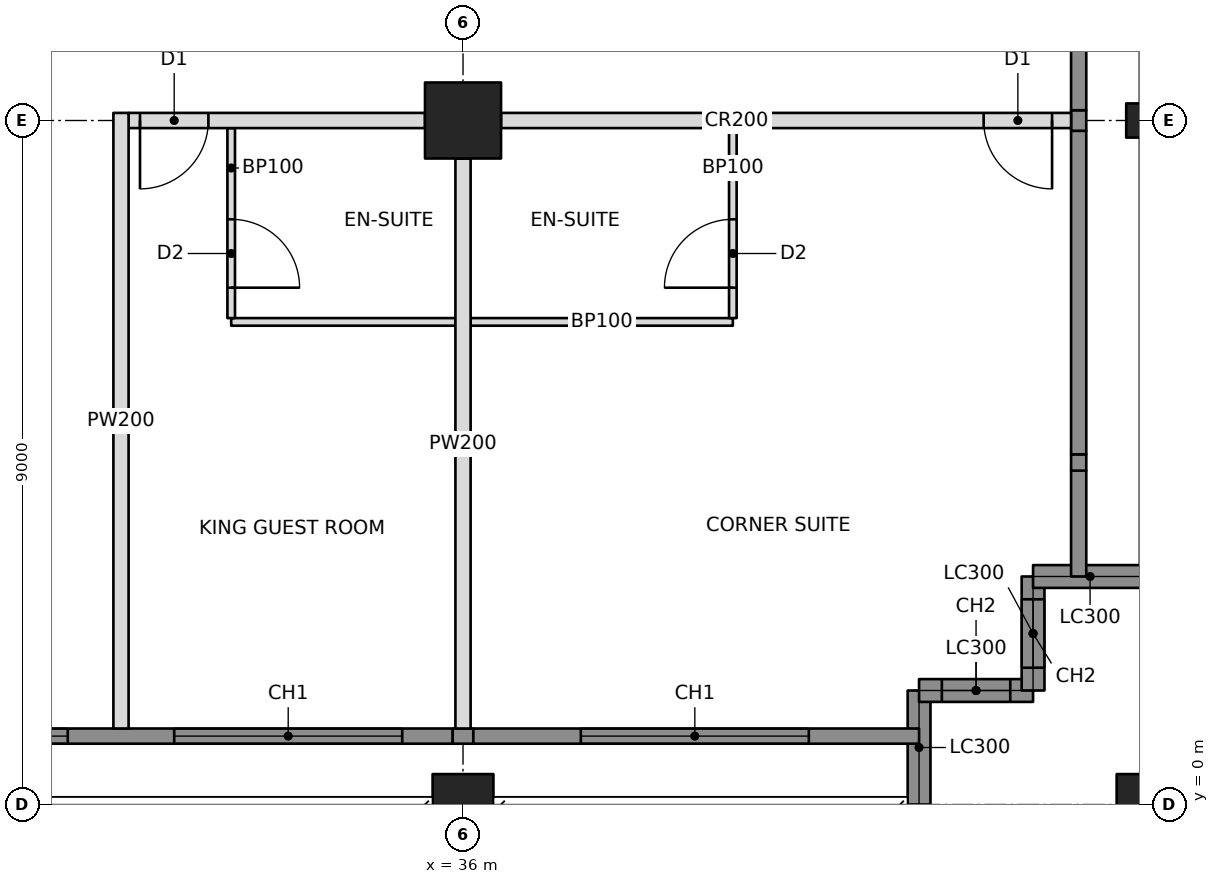
"""IFC4 building model, lengths in metres.
Left out: names, types, materials, properties, quantities, classifications, styles, units other than length and angle.
Written with IfcOpenShell. Run it as: python <this file> out.ifc"""

import sys

from ifc_helpers import new_model, si_unit, direction, frame, frame_2d, origin, origin_2d, place, context, subcontext, project, spatial, rectangle, hollow_rectangle, i_section, extrude, element, fill, save


model = new_model("IFC4")
c1 = context("Model", 3, precision=1e-05, world=origin(), true_north=direction((0.0, 1.0)))
c2 = subcontext(c1, "Body", "Model", "MODEL_VIEW")
j1 = project(units=[si_unit("LENGTHUNIT", "METRE"), si_unit("PLANEANGLEUNIT", "RADIAN")], contexts=[c1])
p1 = place(None, origin())
s1 = spatial("IfcSite", under=j1, at=p1, CompositionType="ELEMENT")
p2 = place(p1, origin())
s2 = spatial("IfcBuilding", under=s1, at=p2, CompositionType="ELEMENT")
p3 = place(p2, frame((0.0, 0.0, 163.8)))
s3 = spatial("IfcBuildingStorey", under=s2, at=p3, CompositionType="ELEMENT", Elevation=163.8)
p4 = place(p3, frame((36.0, 0.0, 0.0), z_axis=(0.0, 0.0, 1.0), x_axis=(1.0, 0.0, 0.0)))
e1 = element("IfcColumn", 1, at=p4, inside=s3, PredefinedType="COLUMN", context=c2, shape_type="SweptSolid", body=[
    extrude(hollow_rectangle(XDim=0.8, YDim=0.8, WallThickness=0.07, at=origin_2d()), origin(), (0.0, 0.0, 1.0), 3.4),
])
p5 = place(p3, frame((36.0, 9.0, 0.0), z_axis=(0.0, 0.0, 1.0), x_axis=(0.0, 1.0, 0.0)))
e2 = element("IfcColumn", 2, at=p5, inside=s3, PredefinedType="COLUMN", context=c2, shape_type="SweptSolid", body=[
    extrude(hollow_rectangle(XDim=1.0, YDim=1.0, WallThickness=0.1, at=origin_2d()), origin(), (0.0, 0.0, 1.0), 3.4),
])
p6 = place(p3, frame((45.0, 0.0, 0.0), z_axis=(0.0, 0.0, 1.0), x_axis=(1.0, 0.0, 0.0)))
e3 = element("IfcColumn", 3, at=p6, inside=s3, PredefinedType="COLUMN", context=c2, shape_type="SweptSolid", body=[
    extrude(hollow_rectangle(XDim=0.8, YDim=0.8, WallThickness=0.07, at=origin_2d()), origin(), (0.0, 0.0, 1.0), 3.4),
])
p7 = place(p3, frame((45.0, 9.0, 0.0), z_axis=(0.0, 0.0, 1.0), x_axis=(0.0, 1.0, 0.0)))
e4 = element("IfcColumn", 4, at=p7, inside=s3, PredefinedType="COLUMN", context=c2, shape_type="SweptSolid", body=[
    extrude(i_section(OverallWidth=0.449, OverallDepth=0.549, WebThickness=0.072, FlangeThickness=0.115, at=origin_2d()), origin(), (0.0, 0.0, 1.0), 3.4),
])
p8 = place(p3, frame((42.0, 0.0, 0.0), z_axis=(0.0, 0.0, 1.0), x_axis=(0.0, 1.0, 0.0)))
e5 = element("IfcWall", 5, at=p8, inside=s3, PredefinedType="SOLIDWALL", context=c2, shape_type="SweptSolid", body=[
    extrude(rectangle(XDim=1.5, YDim=0.3, at=frame_2d((0.75, 0.0))), origin(), (0.0, 0.0, 1.0), 2.42),
])
p9 = place(p3, frame((42.0, 1.5, 0.0), z_axis=(0.0, 0.0, 1.0), x_axis=(1.0, 0.0, 0.0)))
e6 = element("IfcWall", 6, at=p9, inside=s3, PredefinedType="SOLIDWALL", context=c2, shape_type="SweptSolid", body=[
    extrude(rectangle(XDim=1.5, YDim=0.3, at=frame_2d((0.75, 0.0))), origin(), (0.0, 0.0, 1.0), 3.2),
])
p10 = place(p9, frame((0.3, 0.0, 0.6)))
e7 = element("IfcOpeningElement", 7, at=p10, cuts=e6, PredefinedType="OPENING", context=c2, shape_type="SweptSolid", body=[
    extrude(rectangle(XDim=0.9, YDim=2.2, at=frame_2d((0.45, 1.1))), frame((0.0, 0.16, 0.0), z_axis=(0.0, -1.0, 0.0), x_axis=(1.0, 0.0, 0.0)), (0.0, 0.0, 1.0), 0.32),
])
p11 = place(p3, frame((43.5, 1.5, 0.0), z_axis=(0.0, 0.0, 1.0), x_axis=(0.0, 1.0, 0.0)))
e8 = element("IfcWall", 8, at=p11, inside=s3, PredefinedType="SOLIDWALL", context=c2, shape_type="SweptSolid", body=[
    extrude(rectangle(XDim=1.5, YDim=0.3, at=frame_2d((0.75, 0.0))), origin(), (0.0, 0.0, 1.0), 3.2),
])
p12 = place(p11, frame((0.3, 0.0, 0.6)))
e9 = element("IfcOpeningElement", 9, at=p12, cuts=e8, PredefinedType="OPENING", context=c2, shape_type="SweptSolid", body=[
    extrude(rectangle(XDim=0.9, YDim=2.2, at=frame_2d((0.45, 1.1))), frame((0.0, 0.16, 0.0), z_axis=(0.0, -1.0, 0.0), x_axis=(1.0, 0.0, 0.0)), (0.0, 0.0, 1.0), 0.32),
])
p13 = place(p3, frame((43.5, 3.0, 0.0), z_axis=(0.0, 0.0, 1.0), x_axis=(1.0, 0.0, 0.0)))
e10 = element("IfcWall", 10, at=p13, inside=s3, PredefinedType="SOLIDWALL", context=c2, shape_type="SweptSolid", body=[
    extrude(rectangle(XDim=1.5, YDim=0.3, at=frame_2d((0.75, 0.0))), origin(), (0.0, 0.0, 1.0), 2.42),
])
p14 = place(p3, frame((44.1, 3.0, 0.0), z_axis=(0.0, 0.0, 1.0), x_axis=(0.0, 1.0, 0.0)))
e11 = element("IfcWall", 11, at=p14, inside=s3, PredefinedType="SOLIDWALL", context=c2, shape_type="SweptSolid", body=[
    extrude(rectangle(XDim=1.393, YDim=0.2, at=frame_2d((0.696, 0.0))), origin(), (0.0, 0.0, 1.0), 3.2),
])
p15 = place(p3, frame((31.6, 9.0, 0.0), z_axis=(0.0, 0.0, 1.0), x_axis=(1.0, 0.0, 0.0)))
e12 = element("IfcWall", 12, at=p15, inside=s3, PredefinedType="PARTITIONING", context=c2, shape_type="SweptSolid", body=[
    extrude(rectangle(XDim=3.9, YDim=0.2, at=frame_2d((1.95, 0.0))), origin(), (0.0, 0.0, 1.0), 2.405),
])
p16 = place(p15, frame((0.15, 0.0, 0.0)))
e13 = element("IfcOpeningElement", 13, at=p16, cuts=e12, PredefinedType="OPENING", context=c2, shape_type="SweptSolid", body=[
    extrude(rectangle(XDim=0.9, YDim=2.1, at=frame_2d((0.45, 1.05))), frame((0.0, 0.11, 0.0), z_axis=(0.0, -1.0, 0.0), x_axis=(1.0, 0.0, 0.0)), (0.0, 0.0, 1.0), 0.22),
])
p17 = place(p3, frame((36.5, 9.0, 0.0), z_axis=(0.0, 0.0, 1.0), x_axis=(1.0, 0.0, 0.0)))
e14 = element("IfcWall", 14, at=p17, inside=s3, PredefinedType="PARTITIONING", context=c2, shape_type="SweptSolid", body=[
    extrude(rectangle(XDim=7.5, YDim=0.2, at=frame_2d((3.75, 0.0))), origin(), (0.0, 0.0, 1.0), 2.438),
])
p18 = place(p17, frame((6.35, 0.0, 0.0)))
e15 = element("IfcOpeningElement", 15, at=p18, cuts=e14, PredefinedType="OPENING", context=c2, shape_type="SweptSolid", body=[
    extrude(rectangle(XDim=0.9, YDim=2.1, at=frame_2d((0.45, 1.05))), frame((0.0, 0.11, 0.0), z_axis=(0.0, -1.0, 0.0), x_axis=(1.0, 0.0, 0.0)), (0.0, 0.0, 1.0), 0.22),
])
p19 = place(p3, frame((31.5, 9.1, 0.0), z_axis=(0.0, 0.0, 1.0), x_axis=(0.0, -1.0, 0.0)))
e16 = element("IfcWall", 16, at=p19, inside=s3, PredefinedType="PARTITIONING", context=c2, shape_type="SweptSolid", body=[
    extrude(rectangle(XDim=8.1, YDim=0.2, at=frame_2d((4.05, 0.0))), origin(), (0.0, 0.0, 1.0), 2.404),
])
p20 = place(p3, frame((36.0, 8.5, 0.0), z_axis=(0.0, 0.0, 1.0), x_axis=(0.0, -1.0, 0.0)))
e17 = element("IfcWall", 17, at=p20, inside=s3, PredefinedType="PARTITIONING", context=c2, shape_type="SweptSolid", body=[
    extrude(rectangle(XDim=7.5, YDim=0.2, at=frame_2d((3.75, 0.0))), origin(), (0.0, 0.0, 1.0), 2.438),
])
p21 = place(p3, frame((32.95, 6.35, 0.0), z_axis=(0.0, 0.0, 1.0), x_axis=(1.0, 0.0, 0.0)))
e18 = element("IfcWall", 18, at=p21, inside=s3, PredefinedType="PARTITIONING", context=c2, shape_type="SweptSolid", body=[
    extrude(rectangle(XDim=2.95, YDim=0.1, at=frame_2d((1.475, 0.0))), origin(), (0.0, 0.0, 1.0), 2.438),
])
p22 = place(p3, frame((32.95, 8.9, 0.0), z_axis=(0.0, 0.0, 1.0), x_axis=(0.0, -1.0, 0.0)))
e19 = element("IfcWall", 19, at=p22, inside=s3, PredefinedType="PARTITIONING", context=c2, shape_type="SweptSolid", body=[
    extrude(rectangle(XDim=2.5, YDim=0.1, at=frame_2d((1.25, 0.0))), origin(), (0.0, 0.0, 1.0), 2.404),
])
p23 = place(p22, frame((1.2, 0.0, 0.0)))
e20 = element("IfcOpeningElement", 20, at=p23, cuts=e19, PredefinedType="OPENING", context=c2, shape_type="SweptSolid", body=[
    extrude(rectangle(XDim=0.9, YDim=2.1, at=frame_2d((0.45, 1.05))), frame((0.0, 0.06, 0.0), z_axis=(0.0, -1.0, 0.0), x_axis=(1.0, 0.0, 0.0)), (0.0, 0.0, 1.0), 0.12),
])
p24 = place(p3, frame((36.1, 6.35, 0.0), z_axis=(0.0, 0.0, 1.0), x_axis=(1.0, 0.0, 0.0)))
e21 = element("IfcWall", 21, at=p24, inside=s3, PredefinedType="PARTITIONING", context=c2, shape_type="SweptSolid", body=[
    extrude(rectangle(XDim=3.45, YDim=0.1, at=frame_2d((1.725, 0.0))), origin(), (0.0, 0.0, 1.0), 2.438),
])
p25 = place(p3, frame((39.55, 8.9, 0.0), z_axis=(0.0, 0.0, 1.0), x_axis=(0.0, -1.0, 0.0)))
e22 = element("IfcWall", 22, at=p25, inside=s3, PredefinedType="PARTITIONING", context=c2, shape_type="SweptSolid", body=[
    extrude(rectangle(XDim=2.5, YDim=0.1, at=frame_2d((1.25, 0.0))), origin(), (0.0, 0.0, 1.0), 2.438),
])
p26 = place(p25, frame((1.2, 0.0, 0.0)))
e23 = element("IfcOpeningElement", 23, at=p26, cuts=e22, PredefinedType="OPENING", context=c2, shape_type="SweptSolid", body=[
    extrude(rectangle(XDim=0.9, YDim=2.1, at=frame_2d((0.45, 1.05))), frame((0.0, 0.06, 0.0), z_axis=(0.0, -1.0, 0.0), x_axis=(1.0, 0.0, 0.0)), (0.0, 0.0, 1.0), 0.12),
])
p27 = place(p3, frame((27.194, 0.9, 0.0), z_axis=(0.0, 0.0, 1.0), x_axis=(1.0, 0.0, 0.0)))
e24 = element("IfcWall", 24, at=p27, inside=s3, PredefinedType="SOLIDWALL", context=c2, shape_type="SweptSolid", body=[
    extrude(rectangle(XDim=8.671, YDim=0.2, at=frame_2d((4.335, 0.0))), origin(), (0.0, 0.0, 1.0), 3.2),
])
p28 = place(p27, frame((0.606, 0.0, 0.6)))
e25 = element("IfcOpeningElement", 25, at=p28, cuts=e24, PredefinedType="OPENING", context=c2, shape_type="SweptSolid", body=[
    extrude(rectangle(XDim=3.0, YDim=2.2, at=frame_2d((1.5, 1.1))), frame((0.0, 0.11, 0.0), z_axis=(0.0, -1.0, 0.0), x_axis=(1.0, 0.0, 0.0)), (0.0, 0.0, 1.0), 0.22),
])
p29 = place(p27, frame((5.006, 0.0, 0.6)))
e26 = element("IfcOpeningElement", 26, at=p29, cuts=e24, PredefinedType="OPENING", context=c2, shape_type="SweptSolid", body=[
    extrude(rectangle(XDim=3.0, YDim=2.2, at=frame_2d((1.5, 1.1))), frame((0.0, 0.11, 0.0), z_axis=(0.0, -1.0, 0.0), x_axis=(1.0, 0.0, 0.0)), (0.0, 0.0, 1.0), 0.22),
])
p30 = place(p3, frame((35.865, 0.9, 0.0), z_axis=(0.0, 0.0, 1.0), x_axis=(1.0, 0.0, 0.0)))
e27 = element("IfcWall", 27, at=p30, inside=s3, PredefinedType="SOLIDWALL", context=c2, shape_type="SweptSolid", body=[
    extrude(rectangle(XDim=0.271, YDim=0.2, at=frame_2d((0.135, 0.0))), origin(), (0.0, 0.0, 1.0), 2.438),
])
p31 = place(p3, frame((36.135, 0.9, 0.0), z_axis=(0.0, 0.0, 1.0), x_axis=(1.0, 0.0, 0.0)))
e28 = element("IfcWall", 28, at=p31, inside=s3, PredefinedType="SOLIDWALL", context=c2, shape_type="SweptSolid", body=[
    extrude(rectangle(XDim=5.865, YDim=0.2, at=frame_2d((2.932, 0.0))), origin(), (0.0, 0.0, 1.0), 3.2),
])
p32 = place(p31, frame((1.415, 0.0, 0.6)))
e29 = element("IfcOpeningElement", 29, at=p32, cuts=e28, PredefinedType="OPENING", context=c2, shape_type="SweptSolid", body=[
    extrude(rectangle(XDim=3.0, YDim=2.2, at=frame_2d((1.5, 1.1))), frame((0.0, 0.11, 0.0), z_axis=(0.0, -1.0, 0.0), x_axis=(1.0, 0.0, 0.0)), (0.0, 0.0, 1.0), 0.22),
])
p33 = place(p3, frame((44.1, 4.393, 0.0), z_axis=(0.0, 0.0, 1.0), x_axis=(0.0, 1.0, 0.0)))
e30 = element("IfcWall", 30, at=p33, inside=s3, PredefinedType="SOLIDWALL", context=c2, shape_type="SweptSolid", body=[
    extrude(rectangle(XDim=0.215, YDim=0.2, at=frame_2d((0.107, 0.0))), origin(), (0.0, 0.0, 1.0), 2.661),
])
p34 = place(p3, frame((44.1, 4.607, 0.0), z_axis=(0.0, 0.0, 1.0), x_axis=(0.0, 1.0, 0.0)))
e31 = element("IfcWall", 31, at=p34, inside=s3, PredefinedType="SOLIDWALL", context=c2, shape_type="SweptSolid", body=[
    extrude(rectangle(XDim=4.257, YDim=0.2, at=frame_2d((2.129, 0.0))), origin(), (0.0, 0.0, 1.0), 3.2),
])
p35 = place(p3, frame((44.1, 8.865, 0.0), z_axis=(0.0, 0.0, 1.0), x_axis=(0.0, 1.0, 0.0)))
e32 = element("IfcWall", 32, at=p35, inside=s3, PredefinedType="SOLIDWALL", context=c2, shape_type="SweptSolid", body=[
    extrude(rectangle(XDim=0.271, YDim=0.2, at=frame_2d((0.135, 0.0))), origin(), (0.0, 0.0, 1.0), 2.438),
])
p36 = place(p3, frame((44.1, 9.135, 0.0), z_axis=(0.0, 0.0, 1.0), x_axis=(0.0, 1.0, 0.0)))
e33 = element("IfcWall", 33, at=p36, inside=s3, PredefinedType="SOLIDWALL", context=c2, shape_type="SweptSolid", body=[
    extrude(rectangle(XDim=8.671, YDim=0.2, at=frame_2d((4.335, 0.0))), origin(), (0.0, 0.0, 1.0), 3.2),
])
p37 = place(p36, frame((2.015, 0.0, 0.6)))
e34 = element("IfcOpeningElement", 34, at=p37, cuts=e33, PredefinedType="OPENING", context=c2, shape_type="SweptSolid", body=[
    extrude(rectangle(XDim=3.0, YDim=2.2, at=frame_2d((1.5, 1.1))), frame((0.0, 0.11, 0.0), z_axis=(0.0, -1.0, 0.0), x_axis=(1.0, 0.0, 0.0)), (0.0, 0.0, 1.0), 0.22),
])
p38 = place(p36, frame((5.515, 0.0, 0.6)))
e35 = element("IfcOpeningElement", 35, at=p38, cuts=e33, PredefinedType="OPENING", context=c2, shape_type="SweptSolid", body=[
    extrude(rectangle(XDim=3.0, YDim=2.2, at=frame_2d((1.5, 1.1))), frame((0.0, 0.11, 0.0), z_axis=(0.0, -1.0, 0.0), x_axis=(1.0, 0.0, 0.0)), (0.0, 0.0, 1.0), 0.22),
])
p39 = place(p10, origin())
e36 = element("IfcWindow", 36, at=p39, inside=s3, PartitioningType="SINGLE_PANEL", PredefinedType="WINDOW", context=c2, shape_type="SweptSolid", body=[
    extrude(rectangle(XDim=0.9, YDim=2.2, at=frame_2d((0.45, 1.1))), frame((0.0, 0.03, 0.0), z_axis=(0.0, -1.0, 0.0), x_axis=(1.0, 0.0, 0.0)), (0.0, 0.0, 1.0), 0.06),
])
fill(e7, e36)
p40 = place(p12, origin())
e37 = element("IfcWindow", 37, at=p40, inside=s3, PartitioningType="SINGLE_PANEL", PredefinedType="WINDOW", context=c2, shape_type="SweptSolid", body=[
    extrude(rectangle(XDim=0.9, YDim=2.2, at=frame_2d((0.45, 1.1))), frame((0.0, 0.03, 0.0), z_axis=(0.0, -1.0, 0.0), x_axis=(1.0, 0.0, 0.0)), (0.0, 0.0, 1.0), 0.06),
])
fill(e9, e37)
p41 = place(p28, origin())
e38 = element("IfcWindow", 38, at=p41, inside=s3, PartitioningType="TRIPLE_PANEL_VERTICAL", PredefinedType="WINDOW", context=c2, shape_type="SweptSolid", body=[
    extrude(rectangle(XDim=3.0, YDim=2.2, at=frame_2d((1.5, 1.1))), frame((0.0, 0.03, 0.0), z_axis=(0.0, -1.0, 0.0), x_axis=(1.0, 0.0, 0.0)), (0.0, 0.0, 1.0), 0.06),
])
fill(e25, e38)
p42 = place(p29, origin())
e39 = element("IfcWindow", 39, at=p42, inside=s3, PartitioningType="TRIPLE_PANEL_VERTICAL", PredefinedType="WINDOW", context=c2, shape_type="SweptSolid", body=[
    extrude(rectangle(XDim=3.0, YDim=2.2, at=frame_2d((1.5, 1.1))), frame((0.0, 0.03, 0.0), z_axis=(0.0, -1.0, 0.0), x_axis=(1.0, 0.0, 0.0)), (0.0, 0.0, 1.0), 0.06),
])
fill(e26, e39)
p43 = place(p32, origin())
e40 = element("IfcWindow", 40, at=p43, inside=s3, PartitioningType="TRIPLE_PANEL_VERTICAL", PredefinedType="WINDOW", context=c2, shape_type="SweptSolid", body=[
    extrude(rectangle(XDim=3.0, YDim=2.2, at=frame_2d((1.5, 1.1))), frame((0.0, 0.03, 0.0), z_axis=(0.0, -1.0, 0.0), x_axis=(1.0, 0.0, 0.0)), (0.0, 0.0, 1.0), 0.06),
])
fill(e29, e40)
p44 = place(p23, origin())
e41 = element("IfcDoor", 41, at=p44, inside=s3, OperationType="SINGLE_SWING_RIGHT", PredefinedType="DOOR", context=c2, shape_type="SweptSolid", body=[
    extrude(rectangle(XDim=0.9, YDim=2.1, at=frame_2d((0.45, 1.05))), frame((0.0, 0.025, 0.0), z_axis=(0.0, -1.0, 0.0), x_axis=(1.0, 0.0, 0.0)), (0.0, 0.0, 1.0), 0.05),
])
fill(e20, e41)
p45 = place(p16, frame((0.9, 0.0, 0.0), z_axis=(0.0, 0.0, 1.0), x_axis=(-1.0, 0.0, 0.0)))
e42 = element("IfcDoor", 42, at=p45, inside=s3, OperationType="SINGLE_SWING_RIGHT", PredefinedType="DOOR", context=c2, shape_type="SweptSolid", body=[
    extrude(rectangle(XDim=0.9, YDim=2.1, at=frame_2d((0.45, 1.05))), frame((0.0, 0.025, 0.0), z_axis=(0.0, -1.0, 0.0), x_axis=(1.0, 0.0, 0.0)), (0.0, 0.0, 1.0), 0.05),
])
fill(e13, e42)
p46 = place(p26, frame((0.9, 0.0, 0.0), z_axis=(0.0, 0.0, 1.0), x_axis=(-1.0, 0.0, 0.0)))
e43 = element("IfcDoor", 43, at=p46, inside=s3, OperationType="SINGLE_SWING_LEFT", PredefinedType="DOOR", context=c2, shape_type="SweptSolid", body=[
    extrude(rectangle(XDim=0.9, YDim=2.1, at=frame_2d((0.45, 1.05))), frame((0.0, 0.025, 0.0), z_axis=(0.0, -1.0, 0.0), x_axis=(1.0, 0.0, 0.0)), (0.0, 0.0, 1.0), 0.05),
])
fill(e23, e43)
p47 = place(p18, frame((0.9, 0.0, 0.0), z_axis=(0.0, 0.0, 1.0), x_axis=(-1.0, 0.0, 0.0)))
e44 = element("IfcDoor", 44, at=p47, inside=s3, OperationType="SINGLE_SWING_LEFT", PredefinedType="DOOR", context=c2, shape_type="SweptSolid", body=[
    extrude(rectangle(XDim=0.9, YDim=2.1, at=frame_2d((0.45, 1.05))), frame((0.0, 0.025, 0.0), z_axis=(0.0, -1.0, 0.0), x_axis=(1.0, 0.0, 0.0)), (0.0, 0.0, 1.0), 0.05),
])
fill(e15, e44)
save(model, sys.argv[1])
